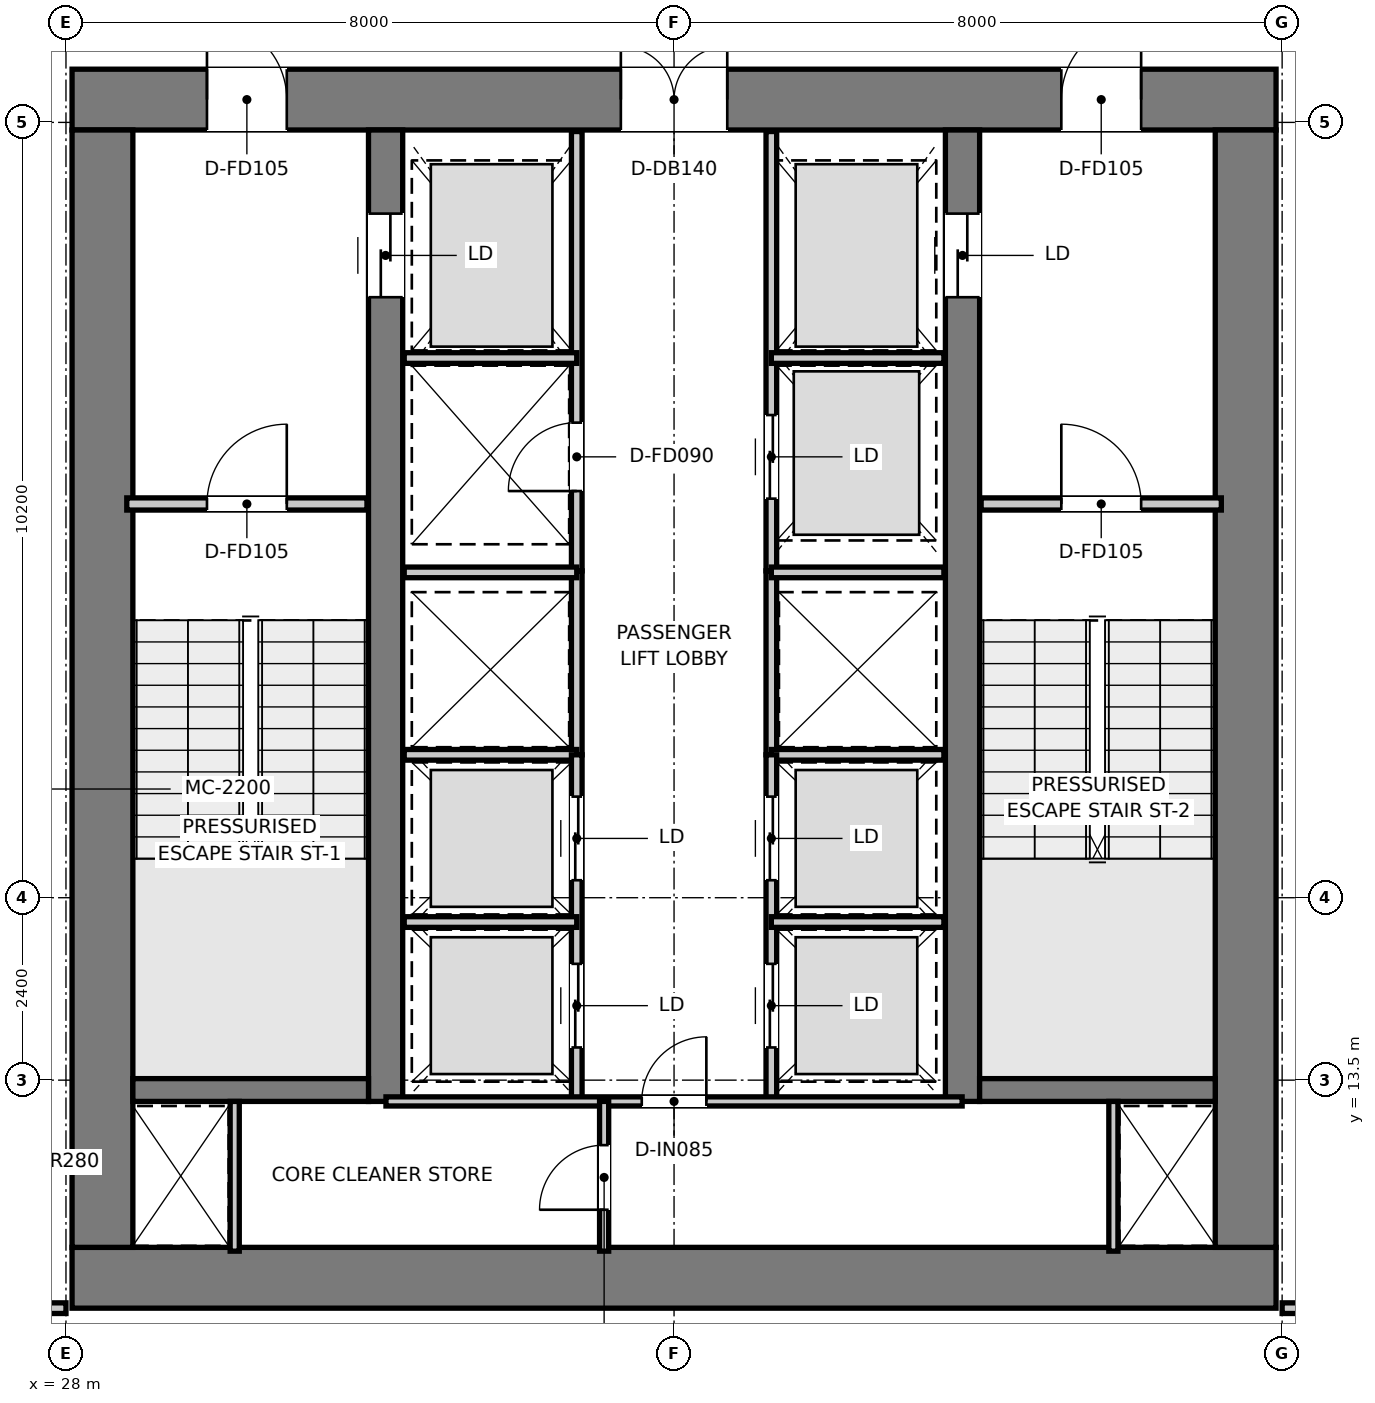
"""IFC4 building model, lengths in metres.
Left out: names, types, materials, properties, quantities, classifications, styles, units other than length and angle.
Written with IfcOpenShell. Run it as: python <this file> out.ifc"""

import sys

from ifc_helpers import new_model, si_unit, direction, frame, frame_2d, origin, place, context, subcontext, project, spatial, rectangle, extrude, element, fill, save


model = new_model("IFC4")
c1 = context("Model", 3, precision=1e-05, world=origin(), true_north=direction((0.0, 1.0)))
c2 = subcontext(c1, "Body", "Model", "MODEL_VIEW")
j1 = project(units=[si_unit("LENGTHUNIT", "METRE"), si_unit("PLANEANGLEUNIT", "RADIAN")], contexts=[c1])
p1 = place(None, origin())
s1 = spatial("IfcSite", under=j1, at=p1, CompositionType="ELEMENT")
p2 = place(p1, origin())
s2 = spatial("IfcBuilding", under=s1, at=p2, CompositionType="ELEMENT")
p3 = place(p2, frame((0.0, 0.0, 64.5)))
s3 = spatial("IfcBuildingStorey", under=s2, at=p3, CompositionType="ELEMENT", Elevation=64.5)
p4 = place(p3, frame((28.08, 10.9, 0.0), z_axis=(0.0, 0.0, 1.0), x_axis=(1.0, 0.0, 0.0)))
e1 = element("IfcWall", 1, at=p4, inside=s3, PredefinedType="SHEAR", context=c2, shape_type="SweptSolid", body=[
    extrude(rectangle(XDim=15.84, YDim=0.8, at=frame_2d((7.92, 0.0))), origin(), (0.0, 0.0, 1.0), 3.95),
])
p5 = place(p3, frame((28.08, 26.4, 0.0), z_axis=(0.0, 0.0, 1.0), x_axis=(1.0, 0.0, 0.0)))
e2 = element("IfcWall", 2, at=p5, inside=s3, PredefinedType="SHEAR", context=c2, shape_type="SweptSolid", body=[
    extrude(rectangle(XDim=15.84, YDim=0.8, at=frame_2d((7.92, 0.0))), origin(), (0.0, 0.0, 1.0), 3.95),
])
p6 = place(p5, frame((7.22, 0.0, 0.0)))
e3 = element("IfcOpeningElement", 3, at=p6, cuts=e2, PredefinedType="OPENING", context=c2, shape_type="SweptSolid", body=[
    extrude(rectangle(XDim=1.4, YDim=2.2, at=frame_2d((0.7, 1.1))), frame((0.0, 0.41, 0.0), z_axis=(0.0, -1.0, 0.0), x_axis=(1.0, 0.0, 0.0)), (0.0, 0.0, 1.0), 0.82),
])
p7 = place(p5, frame((1.775, 0.0, 0.0)))
e4 = element("IfcOpeningElement", 4, at=p7, cuts=e2, PredefinedType="OPENING", context=c2, shape_type="SweptSolid", body=[
    extrude(rectangle(XDim=1.05, YDim=2.1, at=frame_2d((0.525, 1.05))), frame((0.0, 0.41, 0.0), z_axis=(0.0, -1.0, 0.0), x_axis=(1.0, 0.0, 0.0)), (0.0, 0.0, 1.0), 0.82),
])
p8 = place(p5, frame((13.015, 0.0, 0.0)))
e5 = element("IfcOpeningElement", 5, at=p8, cuts=e2, PredefinedType="OPENING", context=c2, shape_type="SweptSolid", body=[
    extrude(rectangle(XDim=1.05, YDim=2.1, at=frame_2d((0.525, 1.05))), frame((0.0, 0.41, 0.0), z_axis=(0.0, -1.0, 0.0), x_axis=(1.0, 0.0, 0.0)), (0.0, 0.0, 1.0), 0.82),
])
for number, where, z_axis, x_axis in (
    (6, (28.48, 11.3, 0.0), (0.0, 0.0, 1.0), (0.0, 1.0, 0.0)),
    (7, (43.52, 11.3, 0.0), (0.0, 0.0, 1.0), (0.0, 1.0, 0.0)),
):
    element("IfcWall", number, at=place(p3, frame(where, z_axis=z_axis, x_axis=x_axis)), inside=s3, PredefinedType="SHEAR", context=c2, shape_type="SweptSolid", body=[
        extrude(rectangle(XDim=14.7, YDim=0.8, at=frame_2d((7.35, 0.0))), origin(), (0.0, 0.0, 1.0), 3.95),
    ])
p9 = place(p3, frame((32.205, 13.22, 0.0), z_axis=(0.0, 0.0, 1.0), x_axis=(0.0, 1.0, 0.0)))
e8 = element("IfcWall", 8, at=p9, inside=s3, PredefinedType="SHEAR", context=c2, shape_type="SweptSolid", body=[
    extrude(rectangle(XDim=12.78, YDim=0.45, at=frame_2d((6.39, 0.0))), origin(), (0.0, 0.0, 1.0), 3.95),
])
p10 = place(p9, frame((10.58, 0.0, 0.0)))
e9 = element("IfcOpeningElement", 9, at=p10, cuts=e8, PredefinedType="OPENING", context=c2, shape_type="SweptSolid", body=[
    extrude(rectangle(XDim=1.1, YDim=2.15, at=frame_2d((0.55, 1.075))), frame((0.0, 0.235, 0.0), z_axis=(0.0, -1.0, 0.0), x_axis=(1.0, 0.0, 0.0)), (0.0, 0.0, 1.0), 0.47),
])
p11 = place(p3, frame((39.795, 13.22, 0.0), z_axis=(0.0, 0.0, 1.0), x_axis=(0.0, 1.0, 0.0)))
e10 = element("IfcWall", 10, at=p11, inside=s3, PredefinedType="SHEAR", context=c2, shape_type="SweptSolid", body=[
    extrude(rectangle(XDim=12.78, YDim=0.45, at=frame_2d((6.39, 0.0))), origin(), (0.0, 0.0, 1.0), 3.95),
])
p12 = place(p11, frame((10.58, 0.0, 0.0)))
e11 = element("IfcOpeningElement", 11, at=p12, cuts=e10, PredefinedType="OPENING", context=c2, shape_type="SweptSolid", body=[
    extrude(rectangle(XDim=1.1, YDim=2.15, at=frame_2d((0.55, 1.075))), frame((0.0, 0.235, 0.0), z_axis=(0.0, -1.0, 0.0), x_axis=(1.0, 0.0, 0.0)), (0.0, 0.0, 1.0), 0.47),
])
for number, where, z_axis, x_axis in (
    (12, (28.88, 13.37, 0.0), (0.0, 0.0, 1.0), (1.0, 0.0, 0.0)),
    (13, (40.02, 13.37, 0.0), (0.0, 0.0, 1.0), (1.0, 0.0, 0.0)),
):
    element("IfcWall", number, at=place(p3, frame(where, z_axis=z_axis, x_axis=x_axis)), inside=s3, PredefinedType="SHEAR", context=c2, shape_type="SweptSolid", body=[
        extrude(rectangle(XDim=3.1, YDim=0.3, at=frame_2d((1.55, 0.0))), origin(), (0.0, 0.0, 1.0), 3.95),
    ])
p13 = place(p3, frame((28.8, 21.08, 0.0), z_axis=(0.0, 0.0, 1.0), x_axis=(1.0, 0.0, 0.0)))
e14 = element("IfcWall", 14, at=p13, inside=s3, PredefinedType="PARTITIONING", context=c2, shape_type="SweptSolid", body=[
    extrude(rectangle(XDim=3.16, YDim=0.16, at=frame_2d((1.58, 0.0))), origin(), (0.0, 0.0, 1.0), 3.67),
])
p14 = place(p13, frame((1.055, 0.0, 0.0)))
e15 = element("IfcOpeningElement", 15, at=p14, cuts=e14, PredefinedType="OPENING", context=c2, shape_type="SweptSolid", body=[
    extrude(rectangle(XDim=1.05, YDim=2.1, at=frame_2d((0.525, 1.05))), frame((0.0, 0.09, 0.0), z_axis=(0.0, -1.0, 0.0), x_axis=(1.0, 0.0, 0.0)), (0.0, 0.0, 1.0), 0.18),
])
p15 = place(p3, frame((40.04, 21.08, 0.0), z_axis=(0.0, 0.0, 1.0), x_axis=(1.0, 0.0, 0.0)))
e16 = element("IfcWall", 16, at=p15, inside=s3, PredefinedType="PARTITIONING", context=c2, shape_type="SweptSolid", body=[
    extrude(rectangle(XDim=3.16, YDim=0.16, at=frame_2d((1.58, 0.0))), origin(), (0.0, 0.0, 1.0), 3.67),
])
p16 = place(p15, frame((1.055, 0.0, 0.0)))
e17 = element("IfcOpeningElement", 17, at=p16, cuts=e16, PredefinedType="OPENING", context=c2, shape_type="SweptSolid", body=[
    extrude(rectangle(XDim=1.05, YDim=2.1, at=frame_2d((0.525, 1.05))), frame((0.0, 0.09, 0.0), z_axis=(0.0, -1.0, 0.0), x_axis=(1.0, 0.0, 0.0)), (0.0, 0.0, 1.0), 0.18),
])
p17 = place(p3, frame((34.72, 20.2, 0.0), z_axis=(0.0, 0.0, 1.0), x_axis=(0.0, 1.0, 0.0)))
e18 = element("IfcWall", 18, at=p17, inside=s3, PredefinedType="PARTITIONING", context=c2, shape_type="SweptSolid", body=[
    extrude(rectangle(XDim=5.78, YDim=0.14, at=frame_2d((2.89, 0.0))), origin(), (0.0, 0.0, 1.0), 2.47),
])
p18 = place(p17, frame((1.05, 0.0, 0.0)))
e19 = element("IfcOpeningElement", 19, at=p18, cuts=e18, PredefinedType="OPENING", context=c2, shape_type="SweptSolid", body=[
    extrude(rectangle(XDim=0.9, YDim=2.1, at=frame_2d((0.45, 1.05))), frame((0.0, 0.08, 0.0), z_axis=(0.0, -1.0, 0.0), x_axis=(1.0, 0.0, 0.0)), (0.0, 0.0, 1.0), 0.16),
])
p19 = place(p3, frame((37.28, 20.2, 0.0), z_axis=(0.0, 0.0, 1.0), x_axis=(0.0, 1.0, 0.0)))
e20 = element("IfcWall", 20, at=p19, inside=s3, PredefinedType="PARTITIONING", context=c2, shape_type="SweptSolid", body=[
    extrude(rectangle(XDim=5.78, YDim=0.14, at=frame_2d((2.89, 0.0))), origin(), (0.0, 0.0, 1.0), 2.47),
])
p20 = place(p19, frame((0.95, 0.0, 0.0)))
e21 = element("IfcOpeningElement", 21, at=p20, cuts=e20, PredefinedType="OPENING", context=c2, shape_type="SweptSolid", body=[
    extrude(rectangle(XDim=1.1, YDim=2.15, at=frame_2d((0.55, 1.075))), frame((0.0, 0.08, 0.0), z_axis=(0.0, -1.0, 0.0), x_axis=(1.0, 0.0, 0.0)), (0.0, 0.0, 1.0), 0.16),
])
for number, where, z_axis, x_axis in (
    (22, (32.45, 23.0, 0.0), (0.0, 0.0, 1.0), (1.0, 0.0, 0.0)),
    (23, (37.28, 23.0, 0.0), (0.0, 0.0, 1.0), (1.0, 0.0, 0.0)),
):
    element("IfcWall", number, at=place(p3, frame(where, z_axis=z_axis, x_axis=x_axis)), inside=s3, PredefinedType="PARTITIONING", context=c2, shape_type="SweptSolid", body=[
        extrude(rectangle(XDim=2.27, YDim=0.14, at=frame_2d((1.135, 0.0))), origin(), (0.0, 0.0, 1.0), 2.47),
    ])
for number, where, z_axis, x_axis in (
    (24, (34.72, 17.78, 0.0), (0.0, 0.0, 1.0), (0.0, 1.0, 0.0)),
    (25, (37.28, 17.78, 0.0), (0.0, 0.0, 1.0), (0.0, 1.0, 0.0)),
):
    element("IfcWall", number, at=place(p3, frame(where, z_axis=z_axis, x_axis=x_axis)), inside=s3, PredefinedType="PARTITIONING", context=c2, shape_type="SweptSolid", body=[
        extrude(rectangle(XDim=2.42, YDim=0.14, at=frame_2d((1.21, 0.0))), origin(), (0.0, 0.0, 1.0), 3.67),
    ])
for number, where, z_axis, x_axis in (
    (26, (32.45, 17.78, 0.0), (0.0, 0.0, 1.0), (1.0, 0.0, 0.0)),
    (27, (32.45, 20.18, 0.0), (0.0, 0.0, 1.0), (1.0, 0.0, 0.0)),
    (28, (37.28, 17.78, 0.0), (0.0, 0.0, 1.0), (1.0, 0.0, 0.0)),
    (29, (37.28, 20.18, 0.0), (0.0, 0.0, 1.0), (1.0, 0.0, 0.0)),
):
    element("IfcWall", number, at=place(p3, frame(where, z_axis=z_axis, x_axis=x_axis)), inside=s3, PredefinedType="PARTITIONING", context=c2, shape_type="SweptSolid", body=[
        extrude(rectangle(XDim=2.27, YDim=0.14, at=frame_2d((1.135, 0.0))), origin(), (0.0, 0.0, 1.0), 3.67),
    ])
p21 = place(p3, frame((34.72, 13.22, 0.0), z_axis=(0.0, 0.0, 1.0), x_axis=(0.0, 1.0, 0.0)))
e30 = element("IfcWall", 30, at=p21, inside=s3, PredefinedType="PARTITIONING", context=c2, shape_type="SweptSolid", body=[
    extrude(rectangle(XDim=4.56, YDim=0.14, at=frame_2d((2.28, 0.0))), origin(), (0.0, 0.0, 1.0), 3.67),
])
p22 = place(p21, frame((0.71, 0.0, 0.0)))
e31 = element("IfcOpeningElement", 31, at=p22, cuts=e30, PredefinedType="OPENING", context=c2, shape_type="SweptSolid", body=[
    extrude(rectangle(XDim=1.1, YDim=2.15, at=frame_2d((0.55, 1.075))), frame((0.0, 0.08, 0.0), z_axis=(0.0, -1.0, 0.0), x_axis=(1.0, 0.0, 0.0)), (0.0, 0.0, 1.0), 0.16),
])
p23 = place(p21, frame((2.91, 0.0, 0.0)))
e32 = element("IfcOpeningElement", 32, at=p23, cuts=e30, PredefinedType="OPENING", context=c2, shape_type="SweptSolid", body=[
    extrude(rectangle(XDim=1.1, YDim=2.15, at=frame_2d((0.55, 1.075))), frame((0.0, 0.08, 0.0), z_axis=(0.0, -1.0, 0.0), x_axis=(1.0, 0.0, 0.0)), (0.0, 0.0, 1.0), 0.16),
])
p24 = place(p3, frame((32.45, 15.58, 0.0), z_axis=(0.0, 0.0, 1.0), x_axis=(1.0, 0.0, 0.0)))
e33 = element("IfcWall", 33, at=p24, inside=s3, PredefinedType="PARTITIONING", context=c2, shape_type="SweptSolid", body=[
    extrude(rectangle(XDim=2.27, YDim=0.14, at=frame_2d((1.135, 0.0))), origin(), (0.0, 0.0, 1.0), 3.67),
])
p25 = place(p3, frame((37.28, 13.22, 0.0), z_axis=(0.0, 0.0, 1.0), x_axis=(0.0, 1.0, 0.0)))
e34 = element("IfcWall", 34, at=p25, inside=s3, PredefinedType="PARTITIONING", context=c2, shape_type="SweptSolid", body=[
    extrude(rectangle(XDim=4.56, YDim=0.14, at=frame_2d((2.28, 0.0))), origin(), (0.0, 0.0, 1.0), 3.67),
])
p26 = place(p25, frame((0.71, 0.0, 0.0)))
e35 = element("IfcOpeningElement", 35, at=p26, cuts=e34, PredefinedType="OPENING", context=c2, shape_type="SweptSolid", body=[
    extrude(rectangle(XDim=1.1, YDim=2.15, at=frame_2d((0.55, 1.075))), frame((0.0, 0.08, 0.0), z_axis=(0.0, -1.0, 0.0), x_axis=(1.0, 0.0, 0.0)), (0.0, 0.0, 1.0), 0.16),
])
p27 = place(p25, frame((2.91, 0.0, 0.0)))
e36 = element("IfcOpeningElement", 36, at=p27, cuts=e34, PredefinedType="OPENING", context=c2, shape_type="SweptSolid", body=[
    extrude(rectangle(XDim=1.1, YDim=2.15, at=frame_2d((0.55, 1.075))), frame((0.0, 0.08, 0.0), z_axis=(0.0, -1.0, 0.0), x_axis=(1.0, 0.0, 0.0)), (0.0, 0.0, 1.0), 0.16),
])
p28 = place(p3, frame((37.28, 15.58, 0.0), z_axis=(0.0, 0.0, 1.0), x_axis=(1.0, 0.0, 0.0)))
e37 = element("IfcWall", 37, at=p28, inside=s3, PredefinedType="PARTITIONING", context=c2, shape_type="SweptSolid", body=[
    extrude(rectangle(XDim=2.27, YDim=0.14, at=frame_2d((1.135, 0.0))), origin(), (0.0, 0.0, 1.0), 3.67),
])
for number, where, z_axis, x_axis in (
    (38, (30.22, 11.25, 0.0), (0.0, 0.0, 1.0), (0.0, 1.0, 0.0)),
    (39, (41.78, 11.25, 0.0), (0.0, 0.0, 1.0), (0.0, 1.0, 0.0)),
):
    element("IfcWall", number, at=place(p3, frame(where, z_axis=z_axis, x_axis=x_axis)), inside=s3, PredefinedType="PARTITIONING", context=c2, shape_type="SweptSolid", body=[
        extrude(rectangle(XDim=1.97, YDim=0.12, at=frame_2d((0.985, 0.0))), origin(), (0.0, 0.0, 1.0), 3.67),
    ])
p29 = place(p3, frame((32.21, 13.22, 0.0), z_axis=(0.0, 0.0, 1.0), x_axis=(1.0, 0.0, 0.0)))
e40 = element("IfcWall", 40, at=p29, inside=s3, PredefinedType="PARTITIONING", context=c2, shape_type="SweptSolid", body=[
    extrude(rectangle(XDim=7.58, YDim=0.12, at=frame_2d((3.79, 0.0))), origin(), (0.0, 0.0, 1.0), 3.67),
])
p30 = place(p29, frame((3.365, 0.0, 0.0)))
e41 = element("IfcOpeningElement", 41, at=p30, cuts=e40, PredefinedType="OPENING", context=c2, shape_type="SweptSolid", body=[
    extrude(rectangle(XDim=0.85, YDim=2.1, at=frame_2d((0.425, 1.05))), frame((0.0, 0.07, 0.0), z_axis=(0.0, -1.0, 0.0), x_axis=(1.0, 0.0, 0.0)), (0.0, 0.0, 1.0), 0.14),
])
p31 = place(p3, frame((35.08, 11.25, 0.0), z_axis=(0.0, 0.0, 1.0), x_axis=(0.0, 1.0, 0.0)))
e42 = element("IfcWall", 42, at=p31, inside=s3, PredefinedType="PARTITIONING", context=c2, shape_type="SweptSolid", body=[
    extrude(rectangle(XDim=1.97, YDim=0.12, at=frame_2d((0.985, 0.0))), origin(), (0.0, 0.0, 1.0), 3.67),
])
p32 = place(p31, frame((0.545, 0.0, 0.0)))
e43 = element("IfcOpeningElement", 43, at=p32, cuts=e42, PredefinedType="OPENING", context=c2, shape_type="SweptSolid", body=[
    extrude(rectangle(XDim=0.85, YDim=2.1, at=frame_2d((0.425, 1.05))), frame((0.0, 0.07, 0.0), z_axis=(0.0, -1.0, 0.0), x_axis=(1.0, 0.0, 0.0)), (0.0, 0.0, 1.0), 0.14),
])
p33 = place(p3, frame((26.32, 10.5, 0.0), z_axis=(0.0, 0.0, 1.0), x_axis=(1.0, 0.0, 0.0)))
e44 = element("IfcWall", 44, at=p33, inside=s3, PredefinedType="PARTITIONING", context=c2, shape_type="SweptSolid", body=[
    extrude(rectangle(XDim=1.68, YDim=0.14, at=frame_2d((0.84, 0.0))), origin(), (0.0, 0.0, 1.0), 3.67),
])
p34 = place(p33, frame((0.445, 0.0, 0.0)))
e45 = element("IfcOpeningElement", 45, at=p34, cuts=e44, PredefinedType="OPENING", context=c2, shape_type="SweptSolid", body=[
    extrude(rectangle(XDim=0.85, YDim=2.1, at=frame_2d((0.425, 1.05))), frame((0.0, 0.08, 0.0), z_axis=(0.0, -1.0, 0.0), x_axis=(1.0, 0.0, 0.0)), (0.0, 0.0, 1.0), 0.16),
])
p35 = place(p3, frame((44.0, 10.5, 0.0), z_axis=(0.0, 0.0, 1.0), x_axis=(1.0, 0.0, 0.0)))
e46 = element("IfcWall", 46, at=p35, inside=s3, PredefinedType="PARTITIONING", context=c2, shape_type="SweptSolid", body=[
    extrude(rectangle(XDim=1.68, YDim=0.14, at=frame_2d((0.84, 0.0))), origin(), (0.0, 0.0, 1.0), 3.67),
])
p36 = place(p14, origin())
e47 = element("IfcDoor", 47, at=p36, inside=s3, OperationType="SINGLE_SWING_RIGHT", PredefinedType="DOOR", context=c2, shape_type="SweptSolid", body=[
    extrude(rectangle(XDim=1.05, YDim=2.1, at=frame_2d((0.525, 1.05))), frame((0.0, 0.025, 0.0), z_axis=(0.0, -1.0, 0.0), x_axis=(1.0, 0.0, 0.0)), (0.0, 0.0, 1.0), 0.05),
])
fill(e15, e47)
p37 = place(p16, origin())
e48 = element("IfcDoor", 48, at=p37, inside=s3, OperationType="SINGLE_SWING_LEFT", PredefinedType="DOOR", context=c2, shape_type="SweptSolid", body=[
    extrude(rectangle(XDim=1.05, YDim=2.1, at=frame_2d((0.525, 1.05))), frame((0.0, 0.025, 0.0), z_axis=(0.0, -1.0, 0.0), x_axis=(1.0, 0.0, 0.0)), (0.0, 0.0, 1.0), 0.05),
])
fill(e17, e48)
p38 = place(p6, origin())
e49 = element("IfcDoor", 49, at=p38, inside=s3, OperationType="DOUBLE_DOOR_SINGLE_SWING", PredefinedType="DOOR", context=c2, shape_type="SweptSolid", body=[
    extrude(rectangle(XDim=1.4, YDim=2.2, at=frame_2d((0.7, 1.1))), frame((0.0, 0.025, 0.0), z_axis=(0.0, -1.0, 0.0), x_axis=(1.0, 0.0, 0.0)), (0.0, 0.0, 1.0), 0.05),
])
fill(e3, e49)
p39 = place(p7, origin())
e50 = element("IfcDoor", 50, at=p39, inside=s3, OperationType="SINGLE_SWING_LEFT", PredefinedType="DOOR", context=c2, shape_type="SweptSolid", body=[
    extrude(rectangle(XDim=1.05, YDim=2.1, at=frame_2d((0.525, 1.05))), frame((0.0, 0.025, 0.0), z_axis=(0.0, -1.0, 0.0), x_axis=(1.0, 0.0, 0.0)), (0.0, 0.0, 1.0), 0.05),
])
fill(e4, e50)
p40 = place(p8, origin())
e51 = element("IfcDoor", 51, at=p40, inside=s3, OperationType="SINGLE_SWING_RIGHT", PredefinedType="DOOR", context=c2, shape_type="SweptSolid", body=[
    extrude(rectangle(XDim=1.05, YDim=2.1, at=frame_2d((0.525, 1.05))), frame((0.0, 0.025, 0.0), z_axis=(0.0, -1.0, 0.0), x_axis=(1.0, 0.0, 0.0)), (0.0, 0.0, 1.0), 0.05),
])
fill(e5, e51)
p41 = place(p10, origin())
e52 = element("IfcDoor", 52, at=p41, inside=s3, OperationType="DOUBLE_DOOR_SLIDING", PredefinedType="DOOR", context=c2, shape_type="SweptSolid", body=[
    extrude(rectangle(XDim=1.1, YDim=2.15, at=frame_2d((0.55, 1.075))), frame((0.0, 0.025, 0.0), z_axis=(0.0, -1.0, 0.0), x_axis=(1.0, 0.0, 0.0)), (0.0, 0.0, 1.0), 0.05),
])
fill(e9, e52)
p42 = place(p12, origin())
e53 = element("IfcDoor", 53, at=p42, inside=s3, OperationType="DOUBLE_DOOR_SLIDING", PredefinedType="DOOR", context=c2, shape_type="SweptSolid", body=[
    extrude(rectangle(XDim=1.1, YDim=2.15, at=frame_2d((0.55, 1.075))), frame((0.0, 0.025, 0.0), z_axis=(0.0, -1.0, 0.0), x_axis=(1.0, 0.0, 0.0)), (0.0, 0.0, 1.0), 0.05),
])
fill(e11, e53)
p43 = place(p18, origin())
e54 = element("IfcDoor", 54, at=p43, inside=s3, OperationType="SINGLE_SWING_LEFT", PredefinedType="DOOR", context=c2, shape_type="SweptSolid", body=[
    extrude(rectangle(XDim=0.9, YDim=2.1, at=frame_2d((0.45, 1.05))), frame((0.0, 0.025, 0.0), z_axis=(0.0, -1.0, 0.0), x_axis=(1.0, 0.0, 0.0)), (0.0, 0.0, 1.0), 0.05),
])
fill(e19, e54)
p44 = place(p20, origin())
e55 = element("IfcDoor", 55, at=p44, inside=s3, OperationType="DOUBLE_DOOR_SLIDING", PredefinedType="DOOR", context=c2, shape_type="SweptSolid", body=[
    extrude(rectangle(XDim=1.1, YDim=2.15, at=frame_2d((0.55, 1.075))), frame((0.0, 0.025, 0.0), z_axis=(0.0, -1.0, 0.0), x_axis=(1.0, 0.0, 0.0)), (0.0, 0.0, 1.0), 0.05),
])
fill(e21, e55)
p45 = place(p22, origin())
e56 = element("IfcDoor", 56, at=p45, inside=s3, OperationType="DOUBLE_DOOR_SLIDING", PredefinedType="DOOR", context=c2, shape_type="SweptSolid", body=[
    extrude(rectangle(XDim=1.1, YDim=2.15, at=frame_2d((0.55, 1.075))), frame((0.0, 0.025, 0.0), z_axis=(0.0, -1.0, 0.0), x_axis=(1.0, 0.0, 0.0)), (0.0, 0.0, 1.0), 0.05),
])
fill(e31, e56)
p46 = place(p23, origin())
e57 = element("IfcDoor", 57, at=p46, inside=s3, OperationType="DOUBLE_DOOR_SLIDING", PredefinedType="DOOR", context=c2, shape_type="SweptSolid", body=[
    extrude(rectangle(XDim=1.1, YDim=2.15, at=frame_2d((0.55, 1.075))), frame((0.0, 0.025, 0.0), z_axis=(0.0, -1.0, 0.0), x_axis=(1.0, 0.0, 0.0)), (0.0, 0.0, 1.0), 0.05),
])
fill(e32, e57)
p47 = place(p26, origin())
e58 = element("IfcDoor", 58, at=p47, inside=s3, OperationType="DOUBLE_DOOR_SLIDING", PredefinedType="DOOR", context=c2, shape_type="SweptSolid", body=[
    extrude(rectangle(XDim=1.1, YDim=2.15, at=frame_2d((0.55, 1.075))), frame((0.0, 0.025, 0.0), z_axis=(0.0, -1.0, 0.0), x_axis=(1.0, 0.0, 0.0)), (0.0, 0.0, 1.0), 0.05),
])
fill(e35, e58)
p48 = place(p27, origin())
e59 = element("IfcDoor", 59, at=p48, inside=s3, OperationType="DOUBLE_DOOR_SLIDING", PredefinedType="DOOR", context=c2, shape_type="SweptSolid", body=[
    extrude(rectangle(XDim=1.1, YDim=2.15, at=frame_2d((0.55, 1.075))), frame((0.0, 0.025, 0.0), z_axis=(0.0, -1.0, 0.0), x_axis=(1.0, 0.0, 0.0)), (0.0, 0.0, 1.0), 0.05),
])
fill(e36, e59)
p49 = place(p30, origin())
e60 = element("IfcDoor", 60, at=p49, inside=s3, OperationType="SINGLE_SWING_RIGHT", PredefinedType="DOOR", context=c2, shape_type="SweptSolid", body=[
    extrude(rectangle(XDim=0.85, YDim=2.1, at=frame_2d((0.425, 1.05))), frame((0.0, 0.025, 0.0), z_axis=(0.0, -1.0, 0.0), x_axis=(1.0, 0.0, 0.0)), (0.0, 0.0, 1.0), 0.05),
])
fill(e41, e60)
p50 = place(p32, origin())
e61 = element("IfcDoor", 61, at=p50, inside=s3, OperationType="SINGLE_SWING_LEFT", PredefinedType="DOOR", context=c2, shape_type="SweptSolid", body=[
    extrude(rectangle(XDim=0.85, YDim=2.1, at=frame_2d((0.425, 1.05))), frame((0.0, 0.025, 0.0), z_axis=(0.0, -1.0, 0.0), x_axis=(1.0, 0.0, 0.0)), (0.0, 0.0, 1.0), 0.05),
])
fill(e43, e61)
save(model, sys.argv[1])
